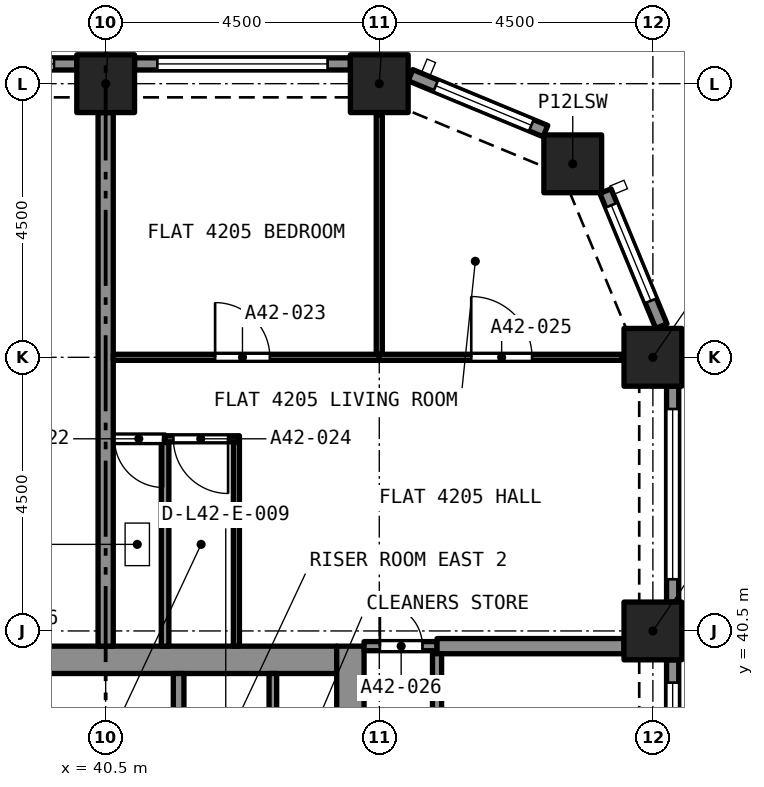
"""IFC4 building model, lengths in metres.
Left out: names, types, materials, properties, quantities, classifications, styles, units other than length and angle.
Written with IfcOpenShell. Run it as: python <this file> out.ifc"""

import sys

from ifc_helpers import new_model, si_unit, direction, frame, frame_2d, origin, origin_2d, place, context, subcontext, project, spatial, rectangle, extrude, element, fill, save


model = new_model("IFC4")
c1 = context("Model", 3, precision=1e-05, world=origin(), true_north=direction((0.0, 1.0)))
c2 = subcontext(c1, "Body", "Model", "MODEL_VIEW")
j1 = project(units=[si_unit("LENGTHUNIT", "METRE"), si_unit("PLANEANGLEUNIT", "RADIAN")], contexts=[c1])
p1 = place(None, origin())
s1 = spatial("IfcSite", under=j1, at=p1, CompositionType="ELEMENT")
p2 = place(p1, origin())
s2 = spatial("IfcBuilding", under=s1, at=p2, CompositionType="ELEMENT")
p3 = place(p2, frame((0.0, 0.0, 150.6)))
s3 = spatial("IfcBuildingStorey", under=s2, at=p3, CompositionType="ELEMENT", Elevation=150.6)
for number, where, z_axis, x_axis in (
    (1, (49.5, 40.5, 0.0), (0.0, 0.0, 1.0), (1.0, 0.0, 0.0)),
    (2, (49.5, 45.0, 0.0), (0.0, 0.0, 1.0), (1.0, 0.0, 0.0)),
    (3, (48.182, 48.182, 0.0), (0.0, 0.0, 1.0), (1.0, 0.0, 0.0)),
    (4, (40.5, 49.5, 0.0), (0.0, 0.0, 1.0), (1.0, 0.0, 0.0)),
    (5, (45.0, 49.5, 0.0), (0.0, 0.0, 1.0), (1.0, 0.0, 0.0)),
):
    element("IfcColumn", number, at=place(p3, frame(where, z_axis=z_axis, x_axis=x_axis)), inside=s3, PredefinedType="COLUMN", context=c2, shape_type="SweptSolid", body=[
        extrude(rectangle(XDim=0.95, YDim=0.95, at=origin_2d()), origin(), (0.0, 0.0, 1.0), 4.4),
    ])
p4 = place(p3, frame((36.7, 40.025, 0.0), z_axis=(0.0, 0.0, 1.0), x_axis=(1.0, 0.0, 0.0)))
e6 = element("IfcWall", 6, at=p4, inside=s3, PredefinedType="SOLIDWALL", context=c2, shape_type="SweptSolid", body=[
    extrude(rectangle(XDim=7.6, YDim=0.45, at=frame_2d((3.8, 0.0))), origin(), (0.0, 0.0, 1.0), 4.4),
])
p5 = place(p3, frame((44.525, 27.25, 0.0), z_axis=(0.0, 0.0, 1.0), x_axis=(0.0, 1.0, 0.0)))
e7 = element("IfcWall", 7, at=p5, inside=s3, PredefinedType="SOLIDWALL", context=c2, shape_type="SweptSolid", body=[
    extrude(rectangle(XDim=13.0, YDim=0.45, at=frame_2d((6.5, 0.0))), origin(), (0.0, 0.0, 1.0), 4.4),
])
p6 = place(p5, frame((8.7, 0.0, 0.0)))
e8 = element("IfcOpeningElement", 8, at=p6, cuts=e7, PredefinedType="OPENING", context=c2, shape_type="SweptSolid", body=[
    extrude(rectangle(XDim=1.2, YDim=2.1, at=frame_2d((0.6, 1.05))), frame((0.0, 0.235, 0.0), z_axis=(0.0, -1.0, 0.0), x_axis=(1.0, 0.0, 0.0)), (0.0, 0.0, 1.0), 0.47),
])
p7 = place(p3, frame((49.825, 40.025, 0.0), z_axis=(0.0, 0.0, 1.0), x_axis=(0.0, -1.0, 0.0)))
e9 = element("IfcWall", 9, at=p7, inside=s3, PredefinedType="SOLIDWALL", context=c2, shape_type="SweptSolid", body=[
    extrude(rectangle(XDim=3.55, YDim=0.2, at=frame_2d((1.775, 0.0))), origin(), (0.0, 0.0, 1.0), 4.4),
])
p8 = place(p7, frame((0.375, 0.0, 0.45)))
e10 = element("IfcOpeningElement", 10, at=p8, cuts=e9, PredefinedType="OPENING", context=c2, shape_type="SweptSolid", body=[
    extrude(rectangle(XDim=2.8, YDim=2.55, at=frame_2d((1.4, 1.275))), frame((0.0, 0.11, 0.0), z_axis=(0.0, -1.0, 0.0), x_axis=(1.0, 0.0, 0.0)), (0.0, 0.0, 1.0), 0.22),
])
p9 = place(p3, frame((49.825, 44.525, 0.0), z_axis=(0.0, 0.0, 1.0), x_axis=(0.0, -1.0, 0.0)))
e11 = element("IfcWall", 11, at=p9, inside=s3, PredefinedType="SOLIDWALL", context=c2, shape_type="SweptSolid", body=[
    extrude(rectangle(XDim=3.55, YDim=0.2, at=frame_2d((1.775, 0.0))), origin(), (0.0, 0.0, 1.0), 4.4),
])
p10 = place(p9, frame((0.375, 0.0, 0.45)))
e12 = element("IfcOpeningElement", 12, at=p10, cuts=e11, PredefinedType="OPENING", context=c2, shape_type="SweptSolid", body=[
    extrude(rectangle(XDim=2.8, YDim=2.55, at=frame_2d((1.4, 1.275))), frame((0.0, 0.11, 0.0), z_axis=(0.0, -1.0, 0.0), x_axis=(1.0, 0.0, 0.0)), (0.0, 0.0, 1.0), 0.22),
])
p11 = place(p3, frame((48.72, 47.733, 0.0), z_axis=(0.0, 0.0, 1.0), x_axis=(0.382680855588, -0.923880599843, 0.0)))
e13 = element("IfcWall", 13, at=p11, inside=s3, PredefinedType="SOLIDWALL", context=c2, shape_type="SweptSolid", body=[
    extrude(rectangle(XDim=2.403, YDim=0.2, at=frame_2d((1.201, 0.0))), origin(), (0.0, 0.0, 1.0), 4.4),
])
p12 = place(p11, frame((0.251, 0.0, 0.45)))
e14 = element("IfcOpeningElement", 14, at=p12, cuts=e13, PredefinedType="OPENING", context=c2, shape_type="SweptSolid", body=[
    extrude(rectangle(XDim=1.7, YDim=2.55, at=frame_2d((0.85, 1.275))), frame((0.0, 0.11, 0.0), z_axis=(0.0, -1.0, 0.0), x_axis=(1.0, 0.0, 0.0)), (0.0, 0.0, 1.0), 0.22),
])
p13 = place(p3, frame((45.513, 49.639, 0.0), z_axis=(0.0, 0.0, 1.0), x_axis=(0.923880599843, -0.382680855588, 0.0)))
e15 = element("IfcWall", 15, at=p13, inside=s3, PredefinedType="SOLIDWALL", context=c2, shape_type="SweptSolid", body=[
    extrude(rectangle(XDim=2.403, YDim=0.2, at=frame_2d((1.201, 0.0))), origin(), (0.0, 0.0, 1.0), 4.4),
])
p14 = place(p13, frame((0.451, 0.0, 0.45)))
e16 = element("IfcOpeningElement", 16, at=p14, cuts=e15, PredefinedType="OPENING", context=c2, shape_type="SweptSolid", body=[
    extrude(rectangle(XDim=1.7, YDim=2.55, at=frame_2d((0.85, 1.275))), frame((0.0, 0.11, 0.0), z_axis=(0.0, -1.0, 0.0), x_axis=(1.0, 0.0, 0.0)), (0.0, 0.0, 1.0), 0.22),
])
p15 = place(p3, frame((40.975, 49.825, 0.0), z_axis=(0.0, 0.0, 1.0), x_axis=(1.0, 0.0, 0.0)))
e17 = element("IfcWall", 17, at=p15, inside=s3, PredefinedType="SOLIDWALL", context=c2, shape_type="SweptSolid", body=[
    extrude(rectangle(XDim=3.55, YDim=0.2, at=frame_2d((1.775, 0.0))), origin(), (0.0, 0.0, 1.0), 4.4),
])
p16 = place(p15, frame((0.375, 0.0, 0.45)))
e18 = element("IfcOpeningElement", 18, at=p16, cuts=e17, PredefinedType="OPENING", context=c2, shape_type="SweptSolid", body=[
    extrude(rectangle(XDim=2.8, YDim=2.55, at=frame_2d((1.4, 1.275))), frame((0.0, 0.11, 0.0), z_axis=(0.0, -1.0, 0.0), x_axis=(1.0, 0.0, 0.0)), (0.0, 0.0, 1.0), 0.22),
])
p17 = place(p3, frame((36.475, 49.825, 0.0), z_axis=(0.0, 0.0, 1.0), x_axis=(1.0, 0.0, 0.0)))
e19 = element("IfcWall", 19, at=p17, inside=s3, PredefinedType="SOLIDWALL", context=c2, shape_type="SweptSolid", body=[
    extrude(rectangle(XDim=3.55, YDim=0.2, at=frame_2d((1.775, 0.0))), origin(), (0.0, 0.0, 1.0), 4.4),
])
p18 = place(p17, frame((0.375, 0.0, 0.45)))
e20 = element("IfcOpeningElement", 20, at=p18, cuts=e19, PredefinedType="OPENING", context=c2, shape_type="SweptSolid", body=[
    extrude(rectangle(XDim=2.8, YDim=2.55, at=frame_2d((1.4, 1.275))), frame((0.0, 0.11, 0.0), z_axis=(0.0, -1.0, 0.0), x_axis=(1.0, 0.0, 0.0)), (0.0, 0.0, 1.0), 0.22),
])
p19 = place(p3, frame((41.477, 43.66, 0.0), z_axis=(0.0, 0.0, 1.0), x_axis=(-1.0, 0.0, 0.0)))
e21 = element("IfcWall", 21, at=p19, inside=s3, PredefinedType="PARTITIONING", context=c2, shape_type="SweptSolid", body=[
    extrude(rectangle(XDim=0.852, YDim=0.125, at=frame_2d((0.426, 0.0))), origin(), (0.0, 0.0, 1.0), 4.1),
])
p20 = place(p19, frame((0.032, 0.0, 0.0)))
e22 = element("IfcOpeningElement", 22, at=p20, cuts=e21, PredefinedType="OPENING", context=c2, shape_type="SweptSolid", body=[
    extrude(rectangle(XDim=0.8, YDim=2.1, at=frame_2d((0.4, 1.05))), frame((0.0, 0.073, 0.0), z_axis=(0.0, -1.0, 0.0), x_axis=(1.0, 0.0, 0.0)), (0.0, 0.0, 1.0), 0.145),
])
p21 = place(p3, frame((41.477, 40.25, 0.0), z_axis=(0.0, 0.0, 1.0), x_axis=(0.0, 1.0, 0.0)))
e23 = element("IfcWall", 23, at=p21, inside=s3, PredefinedType="PARTITIONING", context=c2, shape_type="SweptSolid", body=[
    extrude(rectangle(XDim=3.347, YDim=0.125, at=frame_2d((1.674, 0.0))), origin(), (0.0, 0.0, 1.0), 4.1),
])
p22 = place(p3, frame((40.5, 40.25, 0.0), z_axis=(0.0, 0.0, 1.0), x_axis=(0.0, 1.0, 0.0)))
e24 = element("IfcWall", 24, at=p22, inside=s3, PredefinedType="PARTITIONING", context=c2, shape_type="SweptSolid", body=[
    extrude(rectangle(XDim=8.775, YDim=0.25, at=frame_2d((4.387, 0.0))), origin(), (0.0, 0.0, 1.0), 4.1),
])
p23 = place(p3, frame((40.625, 45.0, 0.0), z_axis=(0.0, 0.0, 1.0), x_axis=(1.0, 0.0, 0.0)))
e25 = element("IfcWall", 25, at=p23, inside=s3, PredefinedType="PARTITIONING", context=c2, shape_type="SweptSolid", body=[
    extrude(rectangle(XDim=4.375, YDim=0.1, at=frame_2d((2.188, 0.0))), origin(), (0.0, 0.0, 1.0), 4.1),
])
p24 = place(p23, frame((1.675, 0.0, 0.0)))
e26 = element("IfcOpeningElement", 26, at=p24, cuts=e25, PredefinedType="OPENING", context=c2, shape_type="SweptSolid", body=[
    extrude(rectangle(XDim=0.9, YDim=2.1, at=frame_2d((0.45, 1.05))), frame((0.0, 0.06, 0.0), z_axis=(0.0, -1.0, 0.0), x_axis=(1.0, 0.0, 0.0)), (0.0, 0.0, 1.0), 0.12),
])
p25 = place(p3, frame((45.0, 45.05, 0.0), z_axis=(0.0, 0.0, 1.0), x_axis=(0.0, 1.0, 0.0)))
e27 = element("IfcWall", 27, at=p25, inside=s3, PredefinedType="PARTITIONING", context=c2, shape_type="SweptSolid", body=[
    extrude(rectangle(XDim=3.936, YDim=0.1, at=frame_2d((1.968, 0.0))), origin(), (0.0, 0.0, 1.0), 4.1),
])
p26 = place(p3, frame((42.65, 40.25, 0.0), z_axis=(0.0, 0.0, 1.0), x_axis=(0.0, 1.0, 0.0)))
e28 = element("IfcWall", 28, at=p26, inside=s3, PredefinedType="PARTITIONING", context=c2, shape_type="SweptSolid", body=[
    extrude(rectangle(XDim=3.36, YDim=0.1, at=frame_2d((1.68, 0.0))), origin(), (0.0, 0.0, 1.0), 4.1),
])
p27 = place(p3, frame((42.7, 43.66, 0.0), z_axis=(0.0, 0.0, 1.0), x_axis=(-1.0, 0.0, 0.0)))
e29 = element("IfcWall", 29, at=p27, inside=s3, PredefinedType="PARTITIONING", context=c2, shape_type="SweptSolid", body=[
    extrude(rectangle(XDim=1.223, YDim=0.1, at=frame_2d((0.611, 0.0))), origin(), (0.0, 0.0, 1.0), 4.1),
])
p28 = place(p27, frame((0.186, 0.0, 0.0)))
e30 = element("IfcOpeningElement", 30, at=p28, cuts=e29, PredefinedType="OPENING", context=c2, shape_type="SweptSolid", body=[
    extrude(rectangle(XDim=0.9, YDim=2.1, at=frame_2d((0.45, 1.05))), frame((0.0, 0.06, 0.0), z_axis=(0.0, -1.0, 0.0), x_axis=(1.0, 0.0, 0.0)), (0.0, 0.0, 1.0), 0.12),
])
p29 = place(p3, frame((45.0, 45.0, 0.0), z_axis=(0.0, 0.0, 1.0), x_axis=(1.0, 0.0, 0.0)))
e31 = element("IfcWall", 31, at=p29, inside=s3, PredefinedType="PARTITIONING", context=c2, shape_type="SweptSolid", body=[
    extrude(rectangle(XDim=3.986, YDim=0.1, at=frame_2d((1.993, 0.0))), origin(), (0.0, 0.0, 1.0), 4.1),
])
p30 = place(p29, frame((1.512, 0.0, 0.0)))
e32 = element("IfcOpeningElement", 32, at=p30, cuts=e31, PredefinedType="OPENING", context=c2, shape_type="SweptSolid", body=[
    extrude(rectangle(XDim=1.0, YDim=2.1, at=frame_2d((0.5, 1.05))), frame((0.0, 0.06, 0.0), z_axis=(0.0, -1.0, 0.0), x_axis=(1.0, 0.0, 0.0)), (0.0, 0.0, 1.0), 0.12),
])
p31 = place(p3, frame((44.75, 40.25, 0.0), z_axis=(0.0, 0.0, 1.0), x_axis=(1.0, 0.0, 0.0)))
e33 = element("IfcWall", 33, at=p31, inside=s3, PredefinedType="PARTITIONING", context=c2, shape_type="SweptSolid", body=[
    extrude(rectangle(XDim=1.2, YDim=0.15, at=frame_2d((0.6, 0.0))), origin(), (0.0, 0.0, 1.0), 4.1),
])
p32 = place(p31, frame((0.26, 0.0, 0.0)))
e34 = element("IfcOpeningElement", 34, at=p32, cuts=e33, PredefinedType="OPENING", context=c2, shape_type="SweptSolid", body=[
    extrude(rectangle(XDim=0.7, YDim=2.1, at=frame_2d((0.35, 1.05))), frame((0.0, 0.085, 0.0), z_axis=(0.0, -1.0, 0.0), x_axis=(1.0, 0.0, 0.0)), (0.0, 0.0, 1.0), 0.17),
])
p33 = place(p3, frame((45.95, 40.25, 0.0), z_axis=(0.0, 0.0, 1.0), x_axis=(1.0, 0.0, 0.0)))
e35 = element("IfcWall", 35, at=p33, inside=s3, PredefinedType="PARTITIONING", context=c2, shape_type="SweptSolid", body=[
    extrude(rectangle(XDim=3.075, YDim=0.25, at=frame_2d((1.538, 0.0))), origin(), (0.0, 0.0, 1.0), 4.1),
])
p34 = place(p3, frame((45.95, 40.125, 0.0), z_axis=(0.0, 0.0, 1.0), x_axis=(0.0, -1.0, 0.0)))
e36 = element("IfcWall", 36, at=p34, inside=s3, PredefinedType="PARTITIONING", context=c2, shape_type="SweptSolid", body=[
    extrude(rectangle(XDim=8.625, YDim=0.15, at=frame_2d((4.312, 0.0))), origin(), (0.0, 0.0, 1.0), 4.1),
])
p35 = place(p34, frame((3.75, 0.0, 0.0)))
e37 = element("IfcOpeningElement", 37, at=p35, cuts=e36, PredefinedType="OPENING", context=c2, shape_type="SweptSolid", body=[
    extrude(rectangle(XDim=1.0, YDim=2.1, at=frame_2d((0.5, 1.05))), frame((0.0, 0.085, 0.0), z_axis=(0.0, -1.0, 0.0), x_axis=(1.0, 0.0, 0.0)), (0.0, 0.0, 1.0), 0.17),
])
p36 = place(p3, frame((41.7, 37.5, 0.0), z_axis=(0.0, 0.0, 1.0), x_axis=(0.0, 1.0, 0.0)))
e38 = element("IfcWall", 38, at=p36, inside=s3, PredefinedType="SOLIDWALL", context=c2, shape_type="SweptSolid", body=[
    extrude(rectangle(XDim=2.3, YDim=0.175, at=frame_2d((1.15, 0.0))), origin(), (0.0, 0.0, 1.0), 4.1),
])
p37 = place(p3, frame((43.25, 37.5, 0.0), z_axis=(0.0, 0.0, 1.0), x_axis=(0.0, 1.0, 0.0)))
e39 = element("IfcWall", 39, at=p37, inside=s3, PredefinedType="PARTITIONING", context=c2, shape_type="SweptSolid", body=[
    extrude(rectangle(XDim=2.3, YDim=0.125, at=frame_2d((1.15, 0.0))), origin(), (0.0, 0.0, 1.0), 4.1),
])
p38 = place(p8, origin())
e40 = element("IfcWindow", 40, at=p38, inside=s3, PartitioningType="SINGLE_PANEL", PredefinedType="WINDOW", context=c2, shape_type="SweptSolid", body=[
    extrude(rectangle(XDim=2.8, YDim=2.55, at=frame_2d((1.4, 1.275))), frame((0.0, 0.03, 0.0), z_axis=(0.0, -1.0, 0.0), x_axis=(1.0, 0.0, 0.0)), (0.0, 0.0, 1.0), 0.06),
])
fill(e10, e40)
p39 = place(p10, origin())
e41 = element("IfcWindow", 41, at=p39, inside=s3, PartitioningType="SINGLE_PANEL", PredefinedType="WINDOW", context=c2, shape_type="SweptSolid", body=[
    extrude(rectangle(XDim=2.8, YDim=2.55, at=frame_2d((1.4, 1.275))), frame((0.0, 0.03, 0.0), z_axis=(0.0, -1.0, 0.0), x_axis=(1.0, 0.0, 0.0)), (0.0, 0.0, 1.0), 0.06),
])
fill(e12, e41)
p40 = place(p12, origin())
e42 = element("IfcWindow", 42, at=p40, inside=s3, PartitioningType="SINGLE_PANEL", PredefinedType="WINDOW", context=c2, shape_type="SweptSolid", body=[
    extrude(rectangle(XDim=1.7, YDim=2.55, at=frame_2d((0.85, 1.275))), frame((0.0, 0.03, 0.0), z_axis=(0.0, -1.0, 0.0), x_axis=(1.0, 0.0, 0.0)), (0.0, 0.0, 1.0), 0.06),
])
fill(e14, e42)
p41 = place(p14, origin())
e43 = element("IfcWindow", 43, at=p41, inside=s3, PartitioningType="SINGLE_PANEL", PredefinedType="WINDOW", context=c2, shape_type="SweptSolid", body=[
    extrude(rectangle(XDim=1.7, YDim=2.55, at=frame_2d((0.85, 1.275))), frame((0.0, 0.03, 0.0), z_axis=(0.0, -1.0, 0.0), x_axis=(1.0, 0.0, 0.0)), (0.0, 0.0, 1.0), 0.06),
])
fill(e16, e43)
p42 = place(p16, origin())
e44 = element("IfcWindow", 44, at=p42, inside=s3, PartitioningType="SINGLE_PANEL", PredefinedType="WINDOW", context=c2, shape_type="SweptSolid", body=[
    extrude(rectangle(XDim=2.8, YDim=2.55, at=frame_2d((1.4, 1.275))), frame((0.0, 0.03, 0.0), z_axis=(0.0, -1.0, 0.0), x_axis=(1.0, 0.0, 0.0)), (0.0, 0.0, 1.0), 0.06),
])
fill(e18, e44)
p43 = place(p18, origin())
e45 = element("IfcWindow", 45, at=p43, inside=s3, PartitioningType="SINGLE_PANEL", PredefinedType="WINDOW", context=c2, shape_type="SweptSolid", body=[
    extrude(rectangle(XDim=2.8, YDim=2.55, at=frame_2d((1.4, 1.275))), frame((0.0, 0.03, 0.0), z_axis=(0.0, -1.0, 0.0), x_axis=(1.0, 0.0, 0.0)), (0.0, 0.0, 1.0), 0.06),
])
fill(e20, e45)
p44 = place(p20, origin())
e46 = element("IfcDoor", 46, at=p44, inside=s3, OperationType="SINGLE_SWING_RIGHT", PredefinedType="DOOR", context=c2, shape_type="SweptSolid", body=[
    extrude(rectangle(XDim=0.8, YDim=2.1, at=frame_2d((0.4, 1.05))), frame((0.0, 0.025, 0.0), z_axis=(0.0, -1.0, 0.0), x_axis=(1.0, 0.0, 0.0)), (0.0, 0.0, 1.0), 0.05),
])
fill(e22, e46)
p45 = place(p24, origin())
e47 = element("IfcDoor", 47, at=p45, inside=s3, OperationType="SINGLE_SWING_LEFT", PredefinedType="DOOR", context=c2, shape_type="SweptSolid", body=[
    extrude(rectangle(XDim=0.9, YDim=2.1, at=frame_2d((0.45, 1.05))), frame((0.0, 0.025, 0.0), z_axis=(0.0, -1.0, 0.0), x_axis=(1.0, 0.0, 0.0)), (0.0, 0.0, 1.0), 0.05),
])
fill(e26, e47)
p46 = place(p28, origin())
e48 = element("IfcDoor", 48, at=p46, inside=s3, OperationType="SINGLE_SWING_RIGHT", PredefinedType="DOOR", context=c2, shape_type="SweptSolid", body=[
    extrude(rectangle(XDim=0.9, YDim=2.1, at=frame_2d((0.45, 1.05))), frame((0.0, 0.025, 0.0), z_axis=(0.0, -1.0, 0.0), x_axis=(1.0, 0.0, 0.0)), (0.0, 0.0, 1.0), 0.05),
])
fill(e30, e48)
p47 = place(p30, origin())
e49 = element("IfcDoor", 49, at=p47, inside=s3, OperationType="SINGLE_SWING_RIGHT", PredefinedType="DOOR", context=c2, shape_type="SweptSolid", body=[
    extrude(rectangle(XDim=1.0, YDim=2.1, at=frame_2d((0.5, 1.05))), frame((0.0, 0.025, 0.0), z_axis=(0.0, -1.0, 0.0), x_axis=(1.0, 0.0, 0.0)), (0.0, 0.0, 1.0), 0.05),
])
fill(e32, e49)
p48 = place(p32, origin())
e50 = element("IfcDoor", 50, at=p48, inside=s3, OperationType="SINGLE_SWING_RIGHT", PredefinedType="DOOR", context=c2, shape_type="SweptSolid", body=[
    extrude(rectangle(XDim=0.7, YDim=2.1, at=frame_2d((0.35, 1.05))), frame((0.0, 0.025, 0.0), z_axis=(0.0, -1.0, 0.0), x_axis=(1.0, 0.0, 0.0)), (0.0, 0.0, 1.0), 0.05),
])
fill(e34, e50)
save(model, sys.argv[1])
